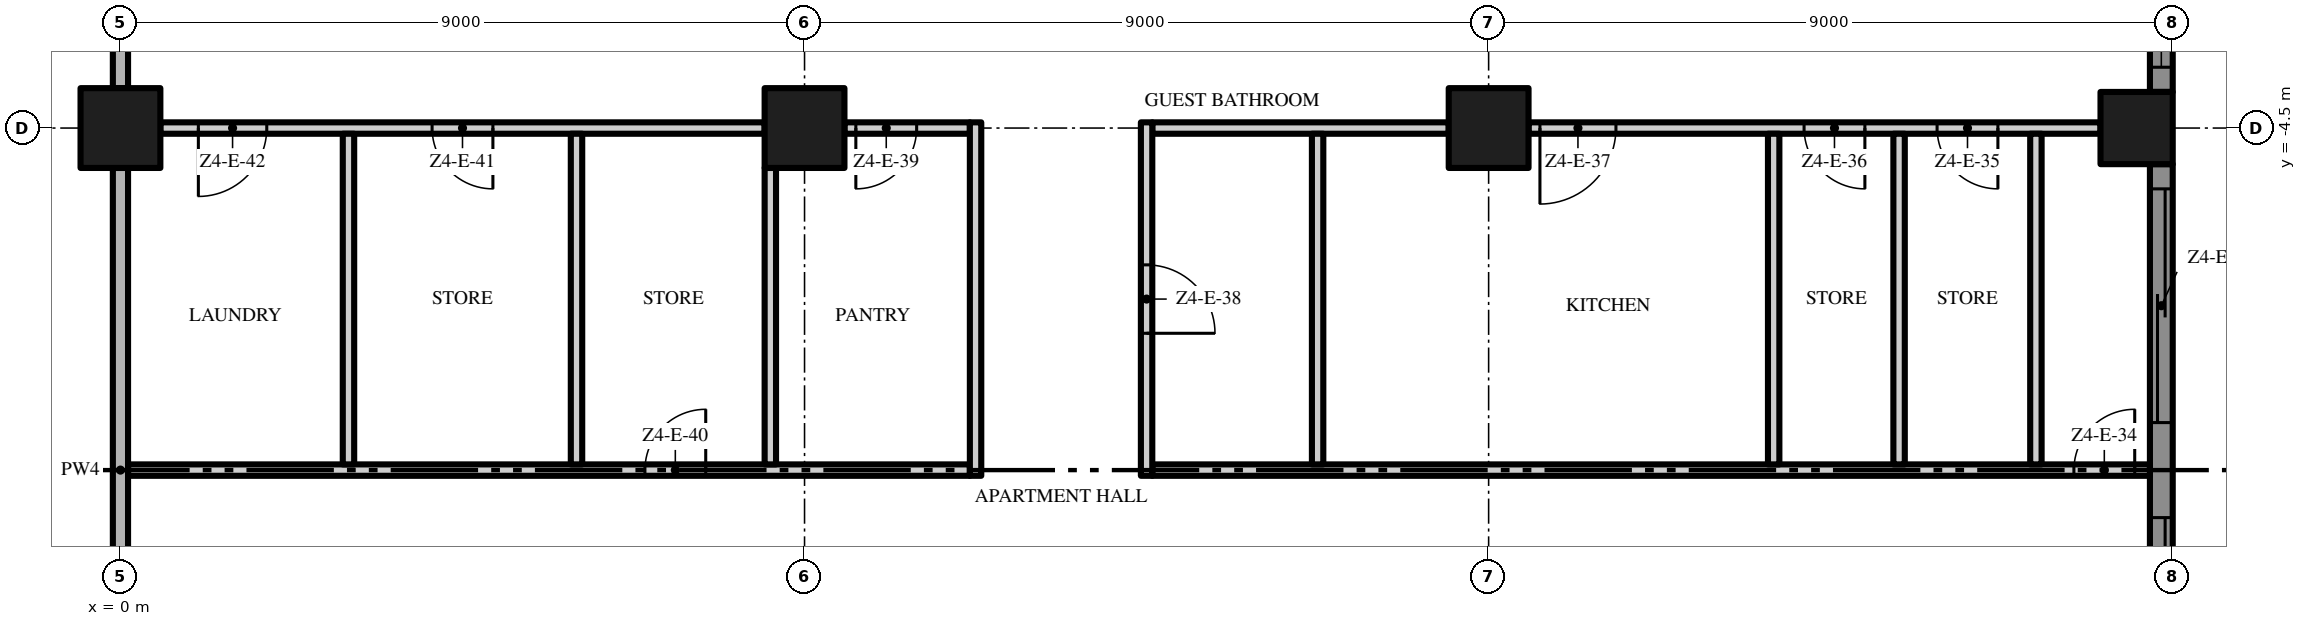
"""IFC4 building model, lengths in metres.
Left out: names, types, materials, properties, quantities, classifications, styles, units other than length and angle.
Written with IfcOpenShell. Run it as: python <this file> out.ifc"""

import sys

from ifc_helpers import new_model, si_unit, direction, frame, frame_2d, origin, origin_2d, place, context, subcontext, project, spatial, polyline, rectangle, outline, extrude, element, fill, save


model = new_model("IFC4")
c1 = context("Model", 3, precision=1e-05, world=origin(), true_north=direction((0.0, 1.0)))
c2 = subcontext(c1, "Body", "Model", "MODEL_VIEW")
j1 = project(units=[si_unit("LENGTHUNIT", "METRE"), si_unit("PLANEANGLEUNIT", "RADIAN")], contexts=[c1])
p1 = place(None, origin())
s1 = spatial("IfcSite", under=j1, at=p1, CompositionType="ELEMENT")
p2 = place(p1, origin())
s2 = spatial("IfcBuilding", under=s1, at=p2, CompositionType="ELEMENT")
p3 = place(p2, frame((0.0, 0.0, 230.0)))
s3 = spatial("IfcBuildingStorey", under=s2, at=p3, CompositionType="ELEMENT", Elevation=230.0)
for number, where, z_axis, x_axis in (
    (1, (0.0, -4.5, 0.0), (0.0, 0.0, 1.0), (1.0, 0.0, 0.0)),
    (2, (18.0, -4.5, 0.0), (0.0, 0.0, 1.0), (1.0, 0.0, 0.0)),
):
    element("IfcColumn", number, at=place(p3, frame(where, z_axis=z_axis, x_axis=x_axis)), inside=s3, PredefinedType="COLUMN", context=c2, shape_type="SweptSolid", body=[
        extrude(rectangle(XDim=1.05, YDim=1.05, at=origin_2d()), origin(), (0.0, 0.0, 1.0), 3.5),
    ])
p4 = place(p3, frame((26.525, -4.5, 0.0), z_axis=(0.0, 0.0, 1.0), x_axis=(1.0, 0.0, 0.0)))
e3 = element("IfcColumn", 3, at=p4, inside=s3, PredefinedType="COLUMN", context=c2, shape_type="SweptSolid", body=[
    extrude(rectangle(XDim=0.95, YDim=0.95, at=origin_2d()), origin(), (0.0, 0.0, 1.0), 3.5),
])
p5 = place(p3, frame((9.0, -4.5, 0.0), z_axis=(0.0, 0.0, 1.0), x_axis=(1.0, 0.0, 0.0)))
e4 = element("IfcColumn", 4, at=p5, inside=s3, PredefinedType="COLUMN", context=c2, shape_type="SweptSolid", body=[
    extrude(rectangle(XDim=1.05, YDim=1.05, at=origin_2d()), origin(), (0.0, 0.0, 1.0), 3.5),
])
p6 = place(p3, frame((26.85, -4.975, 0.0), z_axis=(0.0, 0.0, 1.0), x_axis=(0.0, -1.0, 0.0)))
e5 = element("IfcWall", 5, at=p6, inside=s3, PredefinedType="SOLIDWALL", context=c2, shape_type="SweptSolid", body=[
    extrude(rectangle(XDim=8.05, YDim=0.3, at=frame_2d((4.025, 0.0))), origin(), (0.0, 0.0, 1.0), 3.5),
])
p7 = place(p6, frame((4.65, 0.0, 0.0)))
e6 = element("IfcOpeningElement", 6, at=p7, cuts=e5, PredefinedType="OPENING", context=c2, shape_type="SweptSolid", body=[
    extrude(rectangle(XDim=3.075, YDim=2.4, at=frame_2d((1.538, 1.2))), frame((0.0, 0.16, 0.0), z_axis=(0.0, -1.0, 0.0), x_axis=(1.0, 0.0, 0.0)), (0.0, 0.0, 1.0), 0.32),
])
p8 = place(p6, frame((0.325, 0.0, 0.0)))
e7 = element("IfcOpeningElement", 7, at=p8, cuts=e5, PredefinedType="OPENING", context=c2, shape_type="SweptSolid", body=[
    extrude(rectangle(XDim=3.075, YDim=2.4, at=frame_2d((1.538, 1.2))), frame((0.0, 0.16, 0.0), z_axis=(0.0, -1.0, 0.0), x_axis=(1.0, 0.0, 0.0)), (0.0, 0.0, 1.0), 0.32),
])
p9 = place(p3, frame((26.85, 4.025, 0.0), z_axis=(0.0, 0.0, 1.0), x_axis=(0.0, -1.0, 0.0)))
e8 = element("IfcWall", 8, at=p9, inside=s3, PredefinedType="SOLIDWALL", context=c2, shape_type="SweptSolid", body=[
    extrude(rectangle(XDim=8.05, YDim=0.3, at=frame_2d((4.025, 0.0))), origin(), (0.0, 0.0, 1.0), 3.5),
])
p10 = place(p9, frame((4.65, 0.0, 0.45)))
e9 = element("IfcOpeningElement", 9, at=p10, cuts=e8, PredefinedType="OPENING", context=c2, shape_type="SweptSolid", body=[
    extrude(rectangle(XDim=3.075, YDim=2.65, at=frame_2d((1.538, 1.325))), frame((0.0, 0.16, 0.0), z_axis=(0.0, -1.0, 0.0), x_axis=(1.0, 0.0, 0.0)), (0.0, 0.0, 1.0), 0.32),
])
p11 = place(p9, frame((0.325, 0.0, 0.45)))
e10 = element("IfcOpeningElement", 10, at=p11, cuts=e8, PredefinedType="OPENING", context=c2, shape_type="SweptSolid", body=[
    extrude(rectangle(XDim=3.075, YDim=2.65, at=frame_2d((1.538, 1.325))), frame((0.0, 0.16, 0.0), z_axis=(0.0, -1.0, 0.0), x_axis=(1.0, 0.0, 0.0)), (0.0, 0.0, 1.0), 0.32),
])
p12 = place(p3, origin())
e11 = element("IfcWall", 11, at=p12, inside=s3, PredefinedType="USERDEFINED", context=c2, shape_type="SweptSolid", body=[
    extrude(outline(polyline([(27.951, -18.0), (27.615, -16.5), (27.6, -16.125), (27.731, -15.0), (28.255, -13.5), (28.988, -12.0), (29.649, -10.5), (29.985, -9.0), (30.0, -8.625), (29.869, -7.5), (29.345, -6.0), (28.612, -4.5), (27.951, -3.0), (27.615, -1.5), (27.6, -1.125), (27.731, 0.0), (28.255, 1.5), (28.988, 3.0), (29.649, 4.5), (29.985, 6.0), (30.0, 6.375), (29.869, 7.5), (29.345, 9.0), (28.612, 10.5), (27.951, 12.0), (27.615, 13.5), (27.6, 13.875), (27.731, 15.0), (28.255, 16.5), (28.988, 18.0), (28.763, 18.11), (28.024, 16.596), (27.486, 15.056), (27.349, 13.885), (27.366, 13.467), (27.713, 11.921), (28.385, 10.395), (29.114, 8.904), (29.624, 7.444), (29.749, 6.365), (29.736, 6.033), (29.41, 4.579), (28.761, 3.105), (28.024, 1.596), (27.486, 0.056), (27.349, -1.115), (27.366, -1.533), (27.713, -3.079), (28.385, -4.605), (29.114, -6.096), (29.624, -7.556), (29.749, -8.635), (29.736, -8.967), (29.41, -10.421), (28.761, -11.895), (28.024, -13.404), (27.486, -14.944), (27.349, -16.115), (27.366, -16.533), (27.708, -18.055), (27.951, -18.0)])), origin(), (0.0, 0.0, 1.0), 0.9),
])
p13 = place(p3, frame((0.1, -9.0, 0.0), z_axis=(0.0, 0.0, 1.0), x_axis=(1.0, 0.0, 0.0)))
e12 = element("IfcWall", 12, at=p13, inside=s3, PredefinedType="PARTITIONING", context=c2, shape_type="SweptSolid", body=[
    extrude(rectangle(XDim=11.075, YDim=0.15, at=frame_2d((5.537, 0.0))), origin(), (0.0, 0.0, 1.0), 3.5),
])
p14 = place(p13, frame((6.8, 0.0, 0.0)))
e13 = element("IfcOpeningElement", 13, at=p14, cuts=e12, PredefinedType="OPENING", context=c2, shape_type="SweptSolid", body=[
    extrude(rectangle(XDim=0.8, YDim=2.0, at=frame_2d((0.4, 1.0))), frame((0.0, 0.085, 0.0), z_axis=(0.0, -1.0, 0.0), x_axis=(1.0, 0.0, 0.0)), (0.0, 0.0, 1.0), 0.17),
])
p15 = place(p3, frame((13.575, -9.0, 0.0), z_axis=(0.0, 0.0, 1.0), x_axis=(1.0, 0.0, 0.0)))
e14 = element("IfcWall", 14, at=p15, inside=s3, PredefinedType="PARTITIONING", context=c2, shape_type="SweptSolid", body=[
    extrude(rectangle(XDim=13.125, YDim=0.15, at=frame_2d((6.562, 0.0))), origin(), (0.0, 0.0, 1.0), 3.5),
])
p16 = place(p15, frame((12.125, 0.0, 0.0)))
e15 = element("IfcOpeningElement", 15, at=p16, cuts=e14, PredefinedType="OPENING", context=c2, shape_type="SweptSolid", body=[
    extrude(rectangle(XDim=0.8, YDim=2.0, at=frame_2d((0.4, 1.0))), frame((0.0, 0.085, 0.0), z_axis=(0.0, -1.0, 0.0), x_axis=(1.0, 0.0, 0.0)), (0.0, 0.0, 1.0), 0.17),
])
p17 = place(p3, frame((8.475, -4.5, 0.0), z_axis=(0.0, 0.0, 1.0), x_axis=(-1.0, 0.0, 0.0)))
e16 = element("IfcWall", 16, at=p17, inside=s3, PredefinedType="PARTITIONING", context=c2, shape_type="SweptSolid", body=[
    extrude(rectangle(XDim=7.95, YDim=0.15, at=frame_2d((3.975, 0.0))), origin(), (0.0, 0.0, 1.0), 3.5),
])
p18 = place(p17, frame((3.575, 0.0, 0.0)))
e17 = element("IfcOpeningElement", 17, at=p18, cuts=e16, PredefinedType="OPENING", context=c2, shape_type="SweptSolid", body=[
    extrude(rectangle(XDim=0.8, YDim=2.0, at=frame_2d((0.4, 1.0))), frame((0.0, 0.085, 0.0), z_axis=(0.0, -1.0, 0.0), x_axis=(1.0, 0.0, 0.0)), (0.0, 0.0, 1.0), 0.17),
])
p19 = place(p17, frame((6.55, 0.0, 0.0)))
e18 = element("IfcOpeningElement", 18, at=p19, cuts=e16, PredefinedType="OPENING", context=c2, shape_type="SweptSolid", body=[
    extrude(rectangle(XDim=0.9, YDim=2.1, at=frame_2d((0.45, 1.05))), frame((0.0, 0.085, 0.0), z_axis=(0.0, -1.0, 0.0), x_axis=(1.0, 0.0, 0.0)), (0.0, 0.0, 1.0), 0.17),
])
p20 = place(p3, frame((11.175, -4.5, 0.0), z_axis=(0.0, 0.0, 1.0), x_axis=(-1.0, 0.0, 0.0)))
e19 = element("IfcWall", 19, at=p20, inside=s3, PredefinedType="PARTITIONING", context=c2, shape_type="SweptSolid", body=[
    extrude(rectangle(XDim=1.65, YDim=0.15, at=frame_2d((0.825, 0.0))), origin(), (0.0, 0.0, 1.0), 3.5),
])
p21 = place(p20, frame((0.7, 0.0, 0.0)))
e20 = element("IfcOpeningElement", 20, at=p21, cuts=e19, PredefinedType="OPENING", context=c2, shape_type="SweptSolid", body=[
    extrude(rectangle(XDim=0.8, YDim=2.0, at=frame_2d((0.4, 1.0))), frame((0.0, 0.085, 0.0), z_axis=(0.0, -1.0, 0.0), x_axis=(1.0, 0.0, 0.0)), (0.0, 0.0, 1.0), 0.17),
])
p22 = place(p3, frame((13.575, -4.5, 0.0), z_axis=(0.0, 0.0, 1.0), x_axis=(1.0, 0.0, 0.0)))
e21 = element("IfcWall", 21, at=p22, inside=s3, PredefinedType="PARTITIONING", context=c2, shape_type="SweptSolid", body=[
    extrude(rectangle(XDim=3.9, YDim=0.15, at=frame_2d((1.95, 0.0))), origin(), (0.0, 0.0, 1.0), 3.5),
])
p23 = place(p3, frame((26.05, -4.5, 0.0), z_axis=(0.0, 0.0, 1.0), x_axis=(-1.0, 0.0, 0.0)))
e22 = element("IfcWall", 22, at=p23, inside=s3, PredefinedType="PARTITIONING", context=c2, shape_type="SweptSolid", body=[
    extrude(rectangle(XDim=7.525, YDim=0.15, at=frame_2d((3.763, 0.0))), origin(), (0.0, 0.0, 1.0), 3.5),
])
p24 = place(p23, frame((1.35, 0.0, 0.0)))
e23 = element("IfcOpeningElement", 23, at=p24, cuts=e22, PredefinedType="OPENING", context=c2, shape_type="SweptSolid", body=[
    extrude(rectangle(XDim=0.8, YDim=2.0, at=frame_2d((0.4, 1.0))), frame((0.0, 0.085, 0.0), z_axis=(0.0, -1.0, 0.0), x_axis=(1.0, 0.0, 0.0)), (0.0, 0.0, 1.0), 0.17),
])
p25 = place(p23, frame((3.1, 0.0, 0.0)))
e24 = element("IfcOpeningElement", 24, at=p25, cuts=e22, PredefinedType="OPENING", context=c2, shape_type="SweptSolid", body=[
    extrude(rectangle(XDim=0.8, YDim=2.0, at=frame_2d((0.4, 1.0))), frame((0.0, 0.085, 0.0), z_axis=(0.0, -1.0, 0.0), x_axis=(1.0, 0.0, 0.0)), (0.0, 0.0, 1.0), 0.17),
])
p26 = place(p23, frame((6.375, 0.0, 0.0)))
e25 = element("IfcOpeningElement", 25, at=p26, cuts=e22, PredefinedType="OPENING", context=c2, shape_type="SweptSolid", body=[
    extrude(rectangle(XDim=1.0, YDim=2.4, at=frame_2d((0.5, 1.2))), frame((0.0, 0.085, 0.0), z_axis=(0.0, -1.0, 0.0), x_axis=(1.0, 0.0, 0.0)), (0.0, 0.0, 1.0), 0.17),
])
p27 = place(p3, frame((0.0, -12.975, 0.0), z_axis=(0.0, 0.0, 1.0), x_axis=(0.0, 1.0, 0.0)))
e26 = element("IfcWall", 26, at=p27, inside=s3, PredefinedType="PARTITIONING", context=c2, shape_type="SweptSolid", body=[
    extrude(rectangle(XDim=7.95, YDim=0.2, at=frame_2d((3.975, 0.0))), origin(), (0.0, 0.0, 1.0), 3.5),
])
p28 = place(p3, frame((0.0, -3.975, 0.0), z_axis=(0.0, 0.0, 1.0), x_axis=(0.0, 1.0, 0.0)))
e27 = element("IfcWall", 27, at=p28, inside=s3, PredefinedType="PARTITIONING", context=c2, shape_type="SweptSolid", body=[
    extrude(rectangle(XDim=4.075, YDim=0.2, at=frame_2d((2.038, 0.0))), origin(), (0.0, 0.0, 1.0), 3.5),
])
for number, where, z_axis, x_axis in (
    (28, (3.0, -8.925, 0.0), (0.0, 0.0, 1.0), (0.0, 1.0, 0.0)),
    (29, (6.0, -8.925, 0.0), (0.0, 0.0, 1.0), (0.0, 1.0, 0.0)),
):
    element("IfcWall", number, at=place(p3, frame(where, z_axis=z_axis, x_axis=x_axis)), inside=s3, PredefinedType="PARTITIONING", context=c2, shape_type="SweptSolid", body=[
        extrude(rectangle(XDim=4.35, YDim=0.15, at=frame_2d((2.175, 0.0))), origin(), (0.0, 0.0, 1.0), 3.5),
    ])
p29 = place(p3, frame((8.55, -8.925, 0.0), z_axis=(0.0, 0.0, 1.0), x_axis=(0.0, 1.0, 0.0)))
e30 = element("IfcWall", 30, at=p29, inside=s3, PredefinedType="PARTITIONING", context=c2, shape_type="SweptSolid", body=[
    extrude(rectangle(XDim=3.9, YDim=0.15, at=frame_2d((1.95, 0.0))), origin(), (0.0, 0.0, 1.0), 3.5),
])
p30 = place(p3, frame((11.25, -9.075, 0.0), z_axis=(0.0, 0.0, 1.0), x_axis=(0.0, 1.0, 0.0)))
e31 = element("IfcWall", 31, at=p30, inside=s3, PredefinedType="PARTITIONING", context=c2, shape_type="SweptSolid", body=[
    extrude(rectangle(XDim=4.65, YDim=0.15, at=frame_2d((2.325, 0.0))), origin(), (0.0, 0.0, 1.0), 3.5),
])
p31 = place(p3, frame((13.5, -4.425, 0.0), z_axis=(0.0, 0.0, 1.0), x_axis=(0.0, -1.0, 0.0)))
e32 = element("IfcWall", 32, at=p31, inside=s3, PredefinedType="PARTITIONING", context=c2, shape_type="SweptSolid", body=[
    extrude(rectangle(XDim=4.65, YDim=0.15, at=frame_2d((2.325, 0.0))), origin(), (0.0, 0.0, 1.0), 3.5),
])
p32 = place(p31, frame((1.875, 0.0, 0.0)))
e33 = element("IfcOpeningElement", 33, at=p32, cuts=e32, PredefinedType="OPENING", context=c2, shape_type="SweptSolid", body=[
    extrude(rectangle(XDim=0.9, YDim=2.1, at=frame_2d((0.45, 1.05))), frame((0.0, 0.085, 0.0), z_axis=(0.0, -1.0, 0.0), x_axis=(1.0, 0.0, 0.0)), (0.0, 0.0, 1.0), 0.17),
])
for number, where, z_axis, x_axis in (
    (34, (15.75, -8.925, 0.0), (0.0, 0.0, 1.0), (0.0, 1.0, 0.0)),
    (35, (21.75, -8.925, 0.0), (0.0, 0.0, 1.0), (0.0, 1.0, 0.0)),
    (36, (23.4, -8.925, 0.0), (0.0, 0.0, 1.0), (0.0, 1.0, 0.0)),
    (37, (25.2, -8.925, 0.0), (0.0, 0.0, 1.0), (0.0, 1.0, 0.0)),
):
    element("IfcWall", number, at=place(p3, frame(where, z_axis=z_axis, x_axis=x_axis)), inside=s3, PredefinedType="PARTITIONING", context=c2, shape_type="SweptSolid", body=[
        extrude(rectangle(XDim=4.35, YDim=0.15, at=frame_2d((2.175, 0.0))), origin(), (0.0, 0.0, 1.0), 3.5),
    ])
p33 = place(p7, origin())
e38 = element("IfcDoor", 38, at=p33, inside=s3, OperationType="SINGLE_SWING_LEFT", PredefinedType="DOOR", context=c2, shape_type="SweptSolid", body=[
    extrude(rectangle(XDim=3.075, YDim=2.4, at=frame_2d((1.538, 1.2))), frame((0.0, 0.025, 0.0), z_axis=(0.0, -1.0, 0.0), x_axis=(1.0, 0.0, 0.0)), (0.0, 0.0, 1.0), 0.05),
])
fill(e6, e38)
p34 = place(p8, origin())
e39 = element("IfcDoor", 39, at=p34, inside=s3, OperationType="SINGLE_SWING_LEFT", PredefinedType="DOOR", context=c2, shape_type="SweptSolid", body=[
    extrude(rectangle(XDim=3.075, YDim=2.4, at=frame_2d((1.538, 1.2))), frame((0.0, 0.025, 0.0), z_axis=(0.0, -1.0, 0.0), x_axis=(1.0, 0.0, 0.0)), (0.0, 0.0, 1.0), 0.05),
])
fill(e7, e39)
p35 = place(p10, origin())
e40 = element("IfcWindow", 40, at=p35, inside=s3, PartitioningType="SINGLE_PANEL", PredefinedType="WINDOW", context=c2, shape_type="SweptSolid", body=[
    extrude(rectangle(XDim=3.075, YDim=2.65, at=frame_2d((1.538, 1.325))), frame((0.0, 0.03, 0.0), z_axis=(0.0, -1.0, 0.0), x_axis=(1.0, 0.0, 0.0)), (0.0, 0.0, 1.0), 0.06),
])
fill(e9, e40)
p36 = place(p16, origin())
e41 = element("IfcDoor", 41, at=p36, inside=s3, OperationType="SINGLE_SWING_RIGHT", PredefinedType="DOOR", context=c2, shape_type="SweptSolid", body=[
    extrude(rectangle(XDim=0.8, YDim=2.0, at=frame_2d((0.4, 1.0))), frame((0.0, 0.025, 0.0), z_axis=(0.0, -1.0, 0.0), x_axis=(1.0, 0.0, 0.0)), (0.0, 0.0, 1.0), 0.05),
])
fill(e15, e41)
p37 = place(p24, origin())
e42 = element("IfcDoor", 42, at=p37, inside=s3, OperationType="SINGLE_SWING_LEFT", PredefinedType="DOOR", context=c2, shape_type="SweptSolid", body=[
    extrude(rectangle(XDim=0.8, YDim=2.0, at=frame_2d((0.4, 1.0))), frame((0.0, 0.025, 0.0), z_axis=(0.0, -1.0, 0.0), x_axis=(1.0, 0.0, 0.0)), (0.0, 0.0, 1.0), 0.05),
])
fill(e23, e42)
p38 = place(p25, origin())
e43 = element("IfcDoor", 43, at=p38, inside=s3, OperationType="SINGLE_SWING_LEFT", PredefinedType="DOOR", context=c2, shape_type="SweptSolid", body=[
    extrude(rectangle(XDim=0.8, YDim=2.0, at=frame_2d((0.4, 1.0))), frame((0.0, 0.025, 0.0), z_axis=(0.0, -1.0, 0.0), x_axis=(1.0, 0.0, 0.0)), (0.0, 0.0, 1.0), 0.05),
])
fill(e24, e43)
p39 = place(p26, origin())
e44 = element("IfcDoor", 44, at=p39, inside=s3, OperationType="SINGLE_SWING_RIGHT", PredefinedType="DOOR", context=c2, shape_type="SweptSolid", body=[
    extrude(rectangle(XDim=1.0, YDim=2.4, at=frame_2d((0.5, 1.2))), frame((0.0, 0.025, 0.0), z_axis=(0.0, -1.0, 0.0), x_axis=(1.0, 0.0, 0.0)), (0.0, 0.0, 1.0), 0.05),
])
fill(e25, e44)
p40 = place(p32, origin())
e45 = element("IfcDoor", 45, at=p40, inside=s3, OperationType="SINGLE_SWING_RIGHT", PredefinedType="DOOR", context=c2, shape_type="SweptSolid", body=[
    extrude(rectangle(XDim=0.9, YDim=2.1, at=frame_2d((0.45, 1.05))), frame((0.0, 0.025, 0.0), z_axis=(0.0, -1.0, 0.0), x_axis=(1.0, 0.0, 0.0)), (0.0, 0.0, 1.0), 0.05),
])
fill(e33, e45)
p41 = place(p21, origin())
e46 = element("IfcDoor", 46, at=p41, inside=s3, OperationType="SINGLE_SWING_RIGHT", PredefinedType="DOOR", context=c2, shape_type="SweptSolid", body=[
    extrude(rectangle(XDim=0.8, YDim=2.0, at=frame_2d((0.4, 1.0))), frame((0.0, 0.025, 0.0), z_axis=(0.0, -1.0, 0.0), x_axis=(1.0, 0.0, 0.0)), (0.0, 0.0, 1.0), 0.05),
])
fill(e20, e46)
p42 = place(p14, origin())
e47 = element("IfcDoor", 47, at=p42, inside=s3, OperationType="SINGLE_SWING_RIGHT", PredefinedType="DOOR", context=c2, shape_type="SweptSolid", body=[
    extrude(rectangle(XDim=0.8, YDim=2.0, at=frame_2d((0.4, 1.0))), frame((0.0, 0.025, 0.0), z_axis=(0.0, -1.0, 0.0), x_axis=(1.0, 0.0, 0.0)), (0.0, 0.0, 1.0), 0.05),
])
fill(e13, e47)
p43 = place(p18, origin())
e48 = element("IfcDoor", 48, at=p43, inside=s3, OperationType="SINGLE_SWING_LEFT", PredefinedType="DOOR", context=c2, shape_type="SweptSolid", body=[
    extrude(rectangle(XDim=0.8, YDim=2.0, at=frame_2d((0.4, 1.0))), frame((0.0, 0.025, 0.0), z_axis=(0.0, -1.0, 0.0), x_axis=(1.0, 0.0, 0.0)), (0.0, 0.0, 1.0), 0.05),
])
fill(e17, e48)
p44 = place(p19, origin())
e49 = element("IfcDoor", 49, at=p44, inside=s3, OperationType="SINGLE_SWING_RIGHT", PredefinedType="DOOR", context=c2, shape_type="SweptSolid", body=[
    extrude(rectangle(XDim=0.9, YDim=2.1, at=frame_2d((0.45, 1.05))), frame((0.0, 0.025, 0.0), z_axis=(0.0, -1.0, 0.0), x_axis=(1.0, 0.0, 0.0)), (0.0, 0.0, 1.0), 0.05),
])
fill(e18, e49)
save(model, sys.argv[1])
